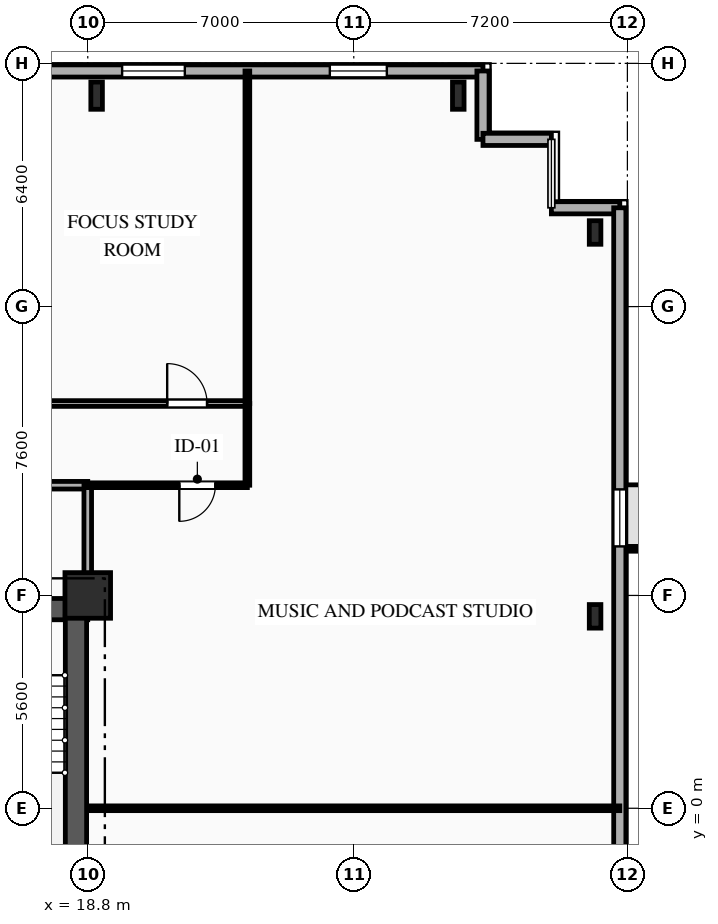
"""IFC4 building model, lengths in metres.
Left out: names, types, materials, properties, quantities, classifications, styles, units other than length and angle.
Written with IfcOpenShell. Run it as: python <this file> out.ifc"""

import sys

from ifc_helpers import new_model, si_unit, direction, frame, frame_2d, origin, origin_2d, place, context, subcontext, project, spatial, rectangle, i_section, extrude, element, fill, save


model = new_model("IFC4")
c1 = context("Model", 3, precision=1e-05, world=origin(), true_north=direction((0.0, 1.0)))
c2 = subcontext(c1, "Body", "Model", "MODEL_VIEW")
j1 = project(units=[si_unit("LENGTHUNIT", "METRE"), si_unit("PLANEANGLEUNIT", "RADIAN")], contexts=[c1])
p1 = place(None, origin())
s1 = spatial("IfcSite", under=j1, at=p1, CompositionType="ELEMENT")
p2 = place(p1, origin())
s2 = spatial("IfcBuilding", under=s1, at=p2, CompositionType="ELEMENT")
p3 = place(p2, frame((0.0, 0.0, 67.2)))
s3 = spatial("IfcBuildingStorey", under=s2, at=p3, CompositionType="ELEMENT", Elevation=67.2)
p4 = place(p3, frame((18.8, 5.6, 0.0), z_axis=(0.0, 0.0, 1.0), x_axis=(1.0, 0.0, 0.0)))
e1 = element("IfcColumn", 1, at=p4, inside=s3, PredefinedType="COLUMN", context=c2, shape_type="SweptSolid", body=[
    extrude(rectangle(XDim=1.2, YDim=1.2, at=origin_2d()), origin(), (0.0, 0.0, 1.0), 3.35),
])
for number, where, z_axis, x_axis in (
    (2, (28.55, 18.75, 0.0), (0.0, 0.0, 1.0), (1.0, 0.0, 0.0)),
    (3, (19.033, 18.75, 0.0), (0.0, 0.0, 1.0), (1.0, 0.0, 0.0)),
):
    element("IfcColumn", number, at=place(p3, frame(where, z_axis=z_axis, x_axis=x_axis)), inside=s3, PredefinedType="COLUMN", context=c2, shape_type="SweptSolid", body=[
        extrude(i_section(OverallWidth=0.304, OverallDepth=0.716, WebThickness=0.021, FlangeThickness=0.04, FilletRadius=0.027, at=origin_2d()), origin(), (0.0, 0.0, 1.0), 3.35),
    ])
for number, where, z_axis, x_axis in (
    (4, (32.15, 5.05, 0.0), (0.0, 0.0, 1.0), (1.0, 0.0, 0.0)),
    (5, (32.15, 15.15, 0.0), (0.0, 0.0, 1.0), (1.0, 0.0, 0.0)),
):
    element("IfcColumn", number, at=place(p3, frame(where, z_axis=z_axis, x_axis=x_axis)), inside=s3, PredefinedType="COLUMN", context=c2, shape_type="SweptSolid", body=[
        extrude(i_section(OverallWidth=0.305, OverallDepth=0.62, WebThickness=0.021, FlangeThickness=0.04, FilletRadius=0.027, at=origin_2d()), origin(), (0.0, 0.0, 1.0), 3.35),
    ])
p5 = place(p3, frame((-29.2, 19.4, 0.0), z_axis=(0.0, 0.0, 1.0), x_axis=(1.0, 0.0, 0.0)))
e6 = element("IfcWall", 6, at=p5, inside=s3, PredefinedType="SOLIDWALL", context=c2, shape_type="SweptSolid", body=[
    extrude(rectangle(XDim=58.4, YDim=0.32, at=frame_2d((29.2, 0.0))), origin(), (0.0, 0.0, 1.0), 3.035),
])
p6 = place(p5, frame((1.255, 0.0, 0.85)))
e7 = element("IfcOpeningElement", 7, at=p6, cuts=e6, PredefinedType="OPENING", context=c2, shape_type="SweptSolid", body=[
    extrude(rectangle(XDim=1.65, YDim=1.85, at=frame_2d((0.825, 0.925))), frame((0.0, 0.17, 0.0), z_axis=(0.0, -1.0, 0.0), x_axis=(1.0, 0.0, 0.0)), (0.0, 0.0, 1.0), 0.34),
])
p7 = place(p5, frame((4.26, 0.0, 0.85)))
e8 = element("IfcOpeningElement", 8, at=p7, cuts=e6, PredefinedType="OPENING", context=c2, shape_type="SweptSolid", body=[
    extrude(rectangle(XDim=1.4, YDim=1.85, at=frame_2d((0.7, 0.925))), frame((0.0, 0.17, 0.0), z_axis=(0.0, -1.0, 0.0), x_axis=(1.0, 0.0, 0.0)), (0.0, 0.0, 1.0), 0.34),
])
p8 = place(p5, frame((8.135, 0.0, 0.85)))
e9 = element("IfcOpeningElement", 9, at=p8, cuts=e6, PredefinedType="OPENING", context=c2, shape_type="SweptSolid", body=[
    extrude(rectangle(XDim=1.65, YDim=1.85, at=frame_2d((0.825, 0.925))), frame((0.0, 0.17, 0.0), z_axis=(0.0, -1.0, 0.0), x_axis=(1.0, 0.0, 0.0)), (0.0, 0.0, 1.0), 0.34),
])
p9 = place(p5, frame((13.575, 0.0, 0.85)))
e10 = element("IfcOpeningElement", 10, at=p9, cuts=e6, PredefinedType="OPENING", context=c2, shape_type="SweptSolid", body=[
    extrude(rectangle(XDim=1.65, YDim=1.85, at=frame_2d((0.825, 0.925))), frame((0.0, 0.17, 0.0), z_axis=(0.0, -1.0, 0.0), x_axis=(1.0, 0.0, 0.0)), (0.0, 0.0, 1.0), 0.34),
])
p10 = place(p5, frame((23.33, 0.0, 0.85)))
e11 = element("IfcOpeningElement", 11, at=p10, cuts=e6, PredefinedType="OPENING", context=c2, shape_type="SweptSolid", body=[
    extrude(rectangle(XDim=1.5, YDim=1.85, at=frame_2d((0.75, 0.925))), frame((0.0, 0.17, 0.0), z_axis=(0.0, -1.0, 0.0), x_axis=(1.0, 0.0, 0.0)), (0.0, 0.0, 1.0), 0.34),
])
p11 = place(p5, frame((33.3, 0.0, 0.85)))
e12 = element("IfcOpeningElement", 12, at=p11, cuts=e6, PredefinedType="OPENING", context=c2, shape_type="SweptSolid", body=[
    extrude(rectangle(XDim=2.2, YDim=1.85, at=frame_2d((1.1, 0.925))), frame((0.0, 0.17, 0.0), z_axis=(0.0, -1.0, 0.0), x_axis=(1.0, 0.0, 0.0)), (0.0, 0.0, 1.0), 0.34),
])
p12 = place(p5, frame((42.335, 0.0, 0.85)))
e13 = element("IfcOpeningElement", 13, at=p12, cuts=e6, PredefinedType="OPENING", context=c2, shape_type="SweptSolid", body=[
    extrude(rectangle(XDim=1.65, YDim=1.85, at=frame_2d((0.825, 0.925))), frame((0.0, 0.17, 0.0), z_axis=(0.0, -1.0, 0.0), x_axis=(1.0, 0.0, 0.0)), (0.0, 0.0, 1.0), 0.34),
])
p13 = place(p5, frame((48.905, 0.0, 0.85)))
e14 = element("IfcOpeningElement", 14, at=p13, cuts=e6, PredefinedType="OPENING", context=c2, shape_type="SweptSolid", body=[
    extrude(rectangle(XDim=1.65, YDim=1.85, at=frame_2d((0.825, 0.925))), frame((0.0, 0.17, 0.0), z_axis=(0.0, -1.0, 0.0), x_axis=(1.0, 0.0, 0.0)), (0.0, 0.0, 1.0), 0.34),
])
p14 = place(p5, frame((54.37, 0.0, 0.85)))
e15 = element("IfcOpeningElement", 15, at=p14, cuts=e6, PredefinedType="OPENING", context=c2, shape_type="SweptSolid", body=[
    extrude(rectangle(XDim=1.5, YDim=1.85, at=frame_2d((0.75, 0.925))), frame((0.0, 0.17, 0.0), z_axis=(0.0, -1.0, 0.0), x_axis=(1.0, 0.0, 0.0)), (0.0, 0.0, 1.0), 0.34),
])
p15 = place(p3, frame((29.2, 19.4, 0.0), z_axis=(0.0, 0.0, 1.0), x_axis=(0.0, -1.0, 0.0)))
e16 = element("IfcWall", 16, at=p15, inside=s3, PredefinedType="SOLIDWALL", context=c2, shape_type="SweptSolid", body=[
    extrude(rectangle(XDim=1.8, YDim=0.32, at=frame_2d((0.9, 0.0))), origin(), (0.0, 0.0, 1.0), 3.035),
])
for number, where, z_axis, x_axis in (
    (17, (29.2, 17.6, 0.0), (0.0, 0.0, 1.0), (1.0, 0.0, 0.0)),
    (18, (31.0, 15.8, 0.0), (0.0, 0.0, 1.0), (1.0, 0.0, 0.0)),
):
    element("IfcWall", number, at=place(p3, frame(where, z_axis=z_axis, x_axis=x_axis)), inside=s3, PredefinedType="SOLIDWALL", context=c2, shape_type="SweptSolid", body=[
        extrude(rectangle(XDim=1.8, YDim=0.32, at=frame_2d((0.9, 0.0))), origin(), (0.0, 0.0, 1.0), 3.035),
    ])
p16 = place(p3, frame((32.8, 15.8, 0.0), z_axis=(0.0, 0.0, 1.0), x_axis=(0.0, -1.0, 0.0)))
e19 = element("IfcWall", 19, at=p16, inside=s3, PredefinedType="SOLIDWALL", context=c2, shape_type="SweptSolid", body=[
    extrude(rectangle(XDim=31.6, YDim=0.32, at=frame_2d((15.8, 0.0))), origin(), (0.0, 0.0, 1.0), 3.035),
])
p17 = place(p16, frame((7.41, 0.0, 0.85)))
e20 = element("IfcOpeningElement", 20, at=p17, cuts=e19, PredefinedType="OPENING", context=c2, shape_type="SweptSolid", body=[
    extrude(rectangle(XDim=1.5, YDim=1.85, at=frame_2d((0.75, 0.925))), frame((0.0, 0.17, 0.0), z_axis=(0.0, -1.0, 0.0), x_axis=(1.0, 0.0, 0.0)), (0.0, 0.0, 1.0), 0.34),
])
p18 = place(p16, frame((22.695, 0.0, 0.85)))
e21 = element("IfcOpeningElement", 21, at=p18, cuts=e19, PredefinedType="OPENING", context=c2, shape_type="SweptSolid", body=[
    extrude(rectangle(XDim=1.65, YDim=1.85, at=frame_2d((0.825, 0.925))), frame((0.0, 0.17, 0.0), z_axis=(0.0, -1.0, 0.0), x_axis=(1.0, 0.0, 0.0)), (0.0, 0.0, 1.0), 0.34),
])
p19 = place(p3, frame((9.2, 5.24, 0.0), z_axis=(0.0, 0.0, 1.0), x_axis=(1.0, 0.0, 0.0)))
e22 = element("IfcWall", 22, at=p19, inside=s3, PredefinedType="SHEAR", context=c2, shape_type="SweptSolid", body=[
    extrude(rectangle(XDim=9.6, YDim=0.56, at=frame_2d((4.8, 0.0))), origin(), (0.0, 0.0, 1.0), 3.035),
])
p20 = place(p19, frame((6.95, 0.0, 0.0)))
e23 = element("IfcOpeningElement", 23, at=p20, cuts=e22, PredefinedType="OPENING", context=c2, shape_type="SweptSolid", body=[
    extrude(rectangle(XDim=1.1, YDim=2.15, at=frame_2d((0.55, 1.075))), frame((0.0, 0.29, 0.0), z_axis=(0.0, -1.0, 0.0), x_axis=(1.0, 0.0, 0.0)), (0.0, 0.0, 1.0), 0.58),
])
p21 = place(p19, frame((3.775, 0.0, 0.0)))
e24 = element("IfcOpeningElement", 24, at=p21, cuts=e22, PredefinedType="OPENING", context=c2, shape_type="SweptSolid", body=[
    extrude(rectangle(XDim=1.05, YDim=2.1, at=frame_2d((0.525, 1.05))), frame((0.0, 0.29, 0.0), z_axis=(0.0, -1.0, 0.0), x_axis=(1.0, 0.0, 0.0)), (0.0, 0.0, 1.0), 0.58),
])
p22 = place(p3, frame((18.49, -5.05, 0.0), z_axis=(0.0, 0.0, 1.0), x_axis=(0.0, 1.0, 0.0)))
e25 = element("IfcWall", 25, at=p22, inside=s3, PredefinedType="SHEAR", context=c2, shape_type="SweptSolid", body=[
    extrude(rectangle(XDim=10.1, YDim=0.56, at=frame_2d((5.05, 0.0))), origin(), (0.0, 0.0, 1.0), 3.035),
])
p23 = place(p3, frame((18.8, 8.5, 0.0), z_axis=(0.0, 0.0, 1.0), x_axis=(-1.0, 0.0, 0.0)))
e26 = element("IfcWall", 26, at=p23, inside=s3, PredefinedType="PARTITIONING", context=c2, shape_type="SweptSolid", body=[
    extrude(rectangle(XDim=6.8, YDim=0.2, at=frame_2d((3.4, 0.0))), origin(), (0.0, 0.0, 1.0), 3.035),
])
p24 = place(p23, frame((3.985, 0.0, 0.0)))
e27 = element("IfcOpeningElement", 27, at=p24, cuts=e26, PredefinedType="OPENING", context=c2, shape_type="SweptSolid", body=[
    extrude(rectangle(XDim=1.1, YDim=2.15, at=frame_2d((0.55, 1.075))), frame((0.0, 0.11, 0.0), z_axis=(0.0, -1.0, 0.0), x_axis=(1.0, 0.0, 0.0)), (0.0, 0.0, 1.0), 0.22),
])
p25 = place(p3, frame((18.8, 5.6, 0.0), z_axis=(0.0, 0.0, 1.0), x_axis=(0.0, 1.0, 0.0)))
e28 = element("IfcWall", 28, at=p25, inside=s3, PredefinedType="PARTITIONING", context=c2, shape_type="SweptSolid", body=[
    extrude(rectangle(XDim=2.9, YDim=0.2, at=frame_2d((1.45, 0.0))), origin(), (0.0, 0.0, 1.0), 2.52),
])
p26 = place(p3, frame((23.0, 8.5, 0.0), z_axis=(0.0, 0.0, 1.0), x_axis=(-1.0, 0.0, 0.0)))
e29 = element("IfcWall", 29, at=p26, inside=s3, PredefinedType="PARTITIONING", context=c2, shape_type="SweptSolid", body=[
    extrude(rectangle(XDim=4.2, YDim=0.125, at=frame_2d((2.1, 0.0))), origin(), (0.0, 0.0, 1.0), 3.035),
])
p27 = place(p26, frame((0.841, 0.0, 0.0)))
e30 = element("IfcOpeningElement", 30, at=p27, cuts=e29, PredefinedType="OPENING", context=c2, shape_type="SweptSolid", body=[
    extrude(rectangle(XDim=0.95, YDim=2.1, at=frame_2d((0.475, 1.05))), frame((0.0, 0.073, 0.0), z_axis=(0.0, -1.0, 0.0), x_axis=(1.0, 0.0, 0.0)), (0.0, 0.0, 1.0), 0.145),
])
p28 = place(p3, frame((23.0, 10.65, 0.0), z_axis=(0.0, 0.0, 1.0), x_axis=(0.0, -1.0, 0.0)))
e31 = element("IfcWall", 31, at=p28, inside=s3, PredefinedType="PARTITIONING", context=c2, shape_type="SweptSolid", body=[
    extrude(rectangle(XDim=2.15, YDim=0.125, at=frame_2d((1.075, 0.0))), origin(), (0.0, 0.0, 1.0), 3.035),
])
p29 = place(p3, frame((16.95, 10.65, 0.0), z_axis=(0.0, 0.0, 1.0), x_axis=(1.0, 0.0, 0.0)))
e32 = element("IfcWall", 32, at=p29, inside=s3, PredefinedType="PARTITIONING", context=c2, shape_type="SweptSolid", body=[
    extrude(rectangle(XDim=6.05, YDim=0.15, at=frame_2d((3.025, 0.0))), origin(), (0.0, 0.0, 1.0), 3.035),
])
p30 = place(p29, frame((3.94, 0.0, 0.0)))
e33 = element("IfcOpeningElement", 33, at=p30, cuts=e32, PredefinedType="OPENING", context=c2, shape_type="SweptSolid", body=[
    extrude(rectangle(XDim=1.05, YDim=2.15, at=frame_2d((0.525, 1.075))), frame((0.0, 0.085, 0.0), z_axis=(0.0, -1.0, 0.0), x_axis=(1.0, 0.0, 0.0)), (0.0, 0.0, 1.0), 0.17),
])
p31 = place(p3, frame((18.8, 0.0, 0.0), z_axis=(0.0, 0.0, 1.0), x_axis=(1.0, 0.0, 0.0)))
e34 = element("IfcWall", 34, at=p31, inside=s3, PredefinedType="PARTITIONING", context=c2, shape_type="SweptSolid", body=[
    extrude(rectangle(XDim=14.0, YDim=0.125, at=frame_2d((7.0, 0.0))), origin(), (0.0, 0.0, 1.0), 3.035),
])
p32 = place(p3, frame((23.0, 10.65, 0.0), z_axis=(0.0, 0.0, 1.0), x_axis=(0.0, 1.0, 0.0)))
e35 = element("IfcWall", 35, at=p32, inside=s3, PredefinedType="PARTITIONING", context=c2, shape_type="SweptSolid", body=[
    extrude(rectangle(XDim=8.75, YDim=0.125, at=frame_2d((4.375, 0.0))), origin(), (0.0, 0.0, 1.0), 3.035),
])
p33 = place(p13, origin())
e36 = element("IfcWindow", 36, at=p33, inside=s3, PartitioningType="SINGLE_PANEL", PredefinedType="WINDOW", context=c2, shape_type="SweptSolid", body=[
    extrude(rectangle(XDim=1.65, YDim=1.85, at=frame_2d((0.825, 0.925))), frame((0.0, 0.03, 0.0), z_axis=(0.0, -1.0, 0.0), x_axis=(1.0, 0.0, 0.0)), (0.0, 0.0, 1.0), 0.06),
])
fill(e14, e36)
p34 = place(p14, origin())
e37 = element("IfcWindow", 37, at=p34, inside=s3, PartitioningType="SINGLE_PANEL", PredefinedType="WINDOW", context=c2, shape_type="SweptSolid", body=[
    extrude(rectangle(XDim=1.5, YDim=1.85, at=frame_2d((0.75, 0.925))), frame((0.0, 0.03, 0.0), z_axis=(0.0, -1.0, 0.0), x_axis=(1.0, 0.0, 0.0)), (0.0, 0.0, 1.0), 0.06),
])
fill(e15, e37)
p35 = place(p17, origin())
e38 = element("IfcWindow", 38, at=p35, inside=s3, PartitioningType="SINGLE_PANEL", PredefinedType="WINDOW", context=c2, shape_type="SweptSolid", body=[
    extrude(rectangle(XDim=1.5, YDim=1.85, at=frame_2d((0.75, 0.925))), frame((0.0, 0.03, 0.0), z_axis=(0.0, -1.0, 0.0), x_axis=(1.0, 0.0, 0.0)), (0.0, 0.0, 1.0), 0.06),
])
fill(e20, e38)
p36 = place(p27, origin())
e39 = element("IfcDoor", 39, at=p36, inside=s3, OperationType="SINGLE_SWING_RIGHT", PredefinedType="DOOR", context=c2, shape_type="SweptSolid", body=[
    extrude(rectangle(XDim=0.95, YDim=2.1, at=frame_2d((0.475, 1.05))), frame((0.0, 0.025, 0.0), z_axis=(0.0, -1.0, 0.0), x_axis=(1.0, 0.0, 0.0)), (0.0, 0.0, 1.0), 0.05),
])
fill(e30, e39)
p37 = place(p30, origin())
e40 = element("IfcDoor", 40, at=p37, inside=s3, OperationType="SINGLE_SWING_LEFT", PredefinedType="DOOR", context=c2, shape_type="SweptSolid", body=[
    extrude(rectangle(XDim=1.05, YDim=2.15, at=frame_2d((0.525, 1.075))), frame((0.0, 0.025, 0.0), z_axis=(0.0, -1.0, 0.0), x_axis=(1.0, 0.0, 0.0)), (0.0, 0.0, 1.0), 0.05),
])
fill(e33, e40)
save(model, sys.argv[1])
